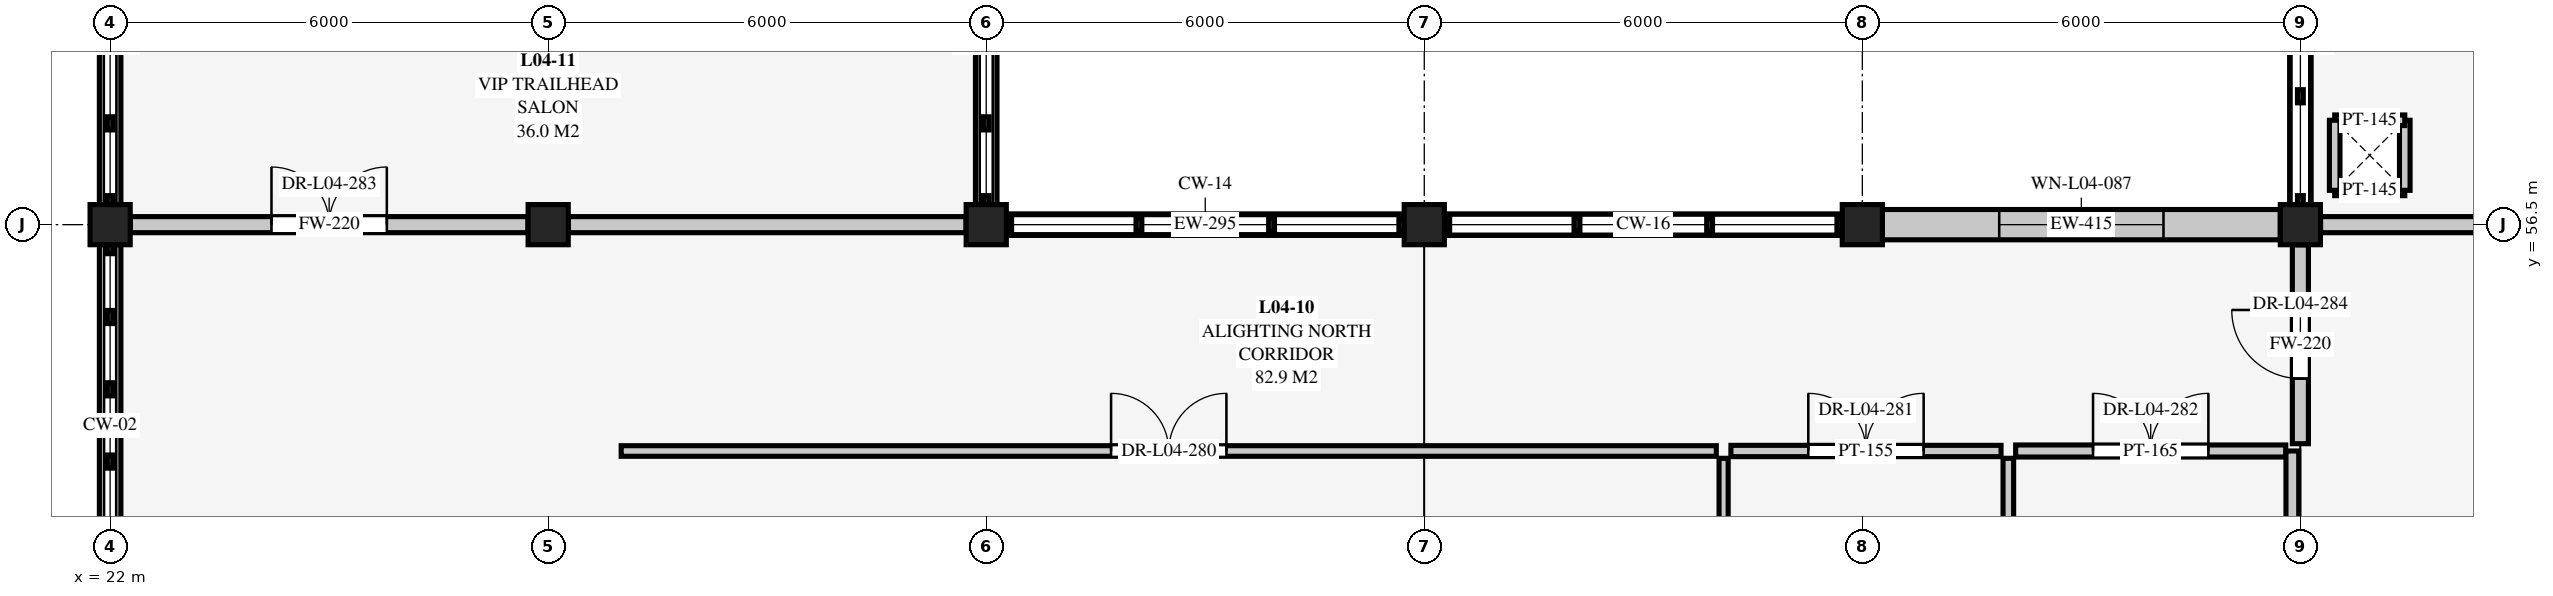
"""IFC4 building model, lengths in metres.
Left out: names, types, materials, properties, quantities, classifications, styles, units other than length and angle.
Written with IfcOpenShell. Run it as: python <this file> out.ifc"""

import sys

from ifc_helpers import new_model, si_unit, direction, frame, frame_2d, origin, origin_2d, place, context, subcontext, project, spatial, rectangle, extrude, element, fill, save


model = new_model("IFC4")
c1 = context("Model", 3, precision=1e-05, world=origin(), true_north=direction((0.0, 1.0)))
c2 = subcontext(c1, "Body", "Model", "MODEL_VIEW")
j1 = project(units=[si_unit("LENGTHUNIT", "METRE"), si_unit("PLANEANGLEUNIT", "RADIAN")], contexts=[c1])
p1 = place(None, origin())
s1 = spatial("IfcSite", under=j1, at=p1, CompositionType="ELEMENT")
p2 = place(p1, origin())
s2 = spatial("IfcBuilding", under=s1, at=p2, CompositionType="ELEMENT")
p3 = place(p2, frame((0.0, 0.0, 13.5)))
s3 = spatial("IfcBuildingStorey", under=s2, at=p3, CompositionType="ELEMENT", Elevation=13.5)
for number, where, z_axis, x_axis in (
    (1, (22.0, 56.5, 0.0), (0.0, 0.0, 1.0), (1.0, 0.0, 0.0)),
    (2, (28.0, 56.5, 0.0), (0.0, 0.0, 1.0), (1.0, 0.0, 0.0)),
    (3, (34.0, 56.5, 0.0), (0.0, 0.0, 1.0), (1.0, 0.0, 0.0)),
    (4, (40.0, 56.5, 0.0), (0.0, 0.0, 1.0), (1.0, 0.0, 0.0)),
    (5, (46.0, 56.5, 0.0), (0.0, 0.0, 1.0), (1.0, 0.0, 0.0)),
    (6, (52.0, 56.5, 0.0), (0.0, 0.0, 1.0), (1.0, 0.0, 0.0)),
):
    element("IfcColumn", number, at=place(p3, frame(where, z_axis=z_axis, x_axis=x_axis)), inside=s3, PredefinedType="COLUMN", context=c2, shape_type="SweptSolid", body=[
        extrude(rectangle(XDim=0.55, YDim=0.55, at=origin_2d()), origin(), (0.0, 0.0, 1.0), 4.5),
    ])
p4 = place(p3, frame((34.275, 56.5, 0.0), z_axis=(0.0, 0.0, 1.0), x_axis=(1.0, 0.0, 0.0)))
e7 = element("IfcWall", 7, at=p4, inside=s3, PredefinedType="SOLIDWALL", context=c2, shape_type="SweptSolid", body=[
    extrude(rectangle(XDim=5.45, YDim=0.295, at=frame_2d((2.725, 0.0))), origin(), (0.0, 0.0, 1.0), 0.41),
])
p5 = place(p3, frame((40.275, 56.5, 0.0), z_axis=(0.0, 0.0, 1.0), x_axis=(1.0, 0.0, 0.0)))
e8 = element("IfcWall", 8, at=p5, inside=s3, PredefinedType="SOLIDWALL", context=c2, shape_type="SweptSolid", body=[
    extrude(rectangle(XDim=5.45, YDim=0.295, at=frame_2d((2.725, 0.0))), origin(), (0.0, 0.0, 1.0), 0.52),
])
p6 = place(p3, frame((46.275, 56.5, 0.0), z_axis=(0.0, 0.0, 1.0), x_axis=(1.0, 0.0, 0.0)))
e9 = element("IfcWall", 9, at=p6, inside=s3, PredefinedType="SOLIDWALL", context=c2, shape_type="SweptSolid", body=[
    extrude(rectangle(XDim=5.45, YDim=0.415, at=frame_2d((2.725, 0.0))), origin(), (0.0, 0.0, 1.0), 3.843),
])
p7 = place(p6, frame((1.6, 0.0, 0.65)))
e10 = element("IfcOpeningElement", 10, at=p7, cuts=e9, PredefinedType="OPENING", context=c2, shape_type="SweptSolid", body=[
    extrude(rectangle(XDim=2.25, YDim=2.45, at=frame_2d((1.125, 1.225))), frame((0.0, 0.218, 0.0), z_axis=(0.0, -1.0, 0.0), x_axis=(1.0, 0.0, 0.0)), (0.0, 0.0, 1.0), 0.435),
])
p8 = place(p3, frame((22.0, 51.275, 0.0), z_axis=(0.0, 0.0, 1.0), x_axis=(0.0, 1.0, 0.0)))
e11 = element("IfcWall", 11, at=p8, inside=s3, PredefinedType="SOLIDWALL", context=c2, shape_type="SweptSolid", body=[
    extrude(rectangle(XDim=4.95, YDim=0.295, at=frame_2d((2.475, 0.0))), origin(), (0.0, 0.0, 1.0), 0.21),
])
p9 = place(p3, frame((22.0, 56.775, 0.0), z_axis=(0.0, 0.0, 1.0), x_axis=(0.0, 1.0, 0.0)))
e12 = element("IfcWall", 12, at=p9, inside=s3, PredefinedType="SOLIDWALL", context=c2, shape_type="SweptSolid", body=[
    extrude(rectangle(XDim=4.45, YDim=0.295, at=frame_2d((2.225, 0.0))), origin(), (0.0, 0.0, 1.0), 0.26),
])
p10 = place(p3, frame((34.0, 61.225, 0.0), z_axis=(0.0, 0.0, 1.0), x_axis=(0.0, -1.0, 0.0)))
e13 = element("IfcWall", 13, at=p10, inside=s3, PredefinedType="SOLIDWALL", context=c2, shape_type="SweptSolid", body=[
    extrude(rectangle(XDim=4.45, YDim=0.295, at=frame_2d((2.225, 0.0))), origin(), (0.0, 0.0, 1.0), 0.31),
])
p11 = place(p3, frame((52.0, 56.775, 0.0), z_axis=(0.0, 0.0, 1.0), x_axis=(0.0, 1.0, 0.0)))
e14 = element("IfcWall", 14, at=p11, inside=s3, PredefinedType="SOLIDWALL", context=c2, shape_type="SweptSolid", body=[
    extrude(rectangle(XDim=4.45, YDim=0.295, at=frame_2d((2.225, 0.0))), origin(), (0.0, 0.0, 1.0), 0.46),
])
for number, where, z_axis, x_axis in (
    (15, (52.47, 56.97, 0.0), (0.0, 0.0, 1.0), (1.0, 0.0, 0.0)),
    (16, (53.43, 56.97, 0.0), (0.0, 0.0, 1.0), (0.0, 1.0, 0.0)),
    (17, (53.43, 57.93, 0.0), (0.0, 0.0, 1.0), (-1.0, 0.0, 0.0)),
    (18, (52.47, 57.93, 0.0), (0.0, 0.0, 1.0), (0.0, -1.0, 0.0)),
):
    element("IfcWall", number, at=place(p3, frame(where, z_axis=z_axis, x_axis=x_axis)), inside=s3, PredefinedType="PARTITIONING", context=c2, shape_type="SweptSolid", body=[
        extrude(rectangle(XDim=0.96, YDim=0.145, at=frame_2d((0.48, 0.0))), origin(), (0.0, 0.0, 1.0), 4.24),
    ])
p12 = place(p3, frame((44.1, 45.124, 0.0), z_axis=(0.0, 0.0, 1.0), x_axis=(0.0, 1.0, 0.0)))
e19 = element("IfcWall", 19, at=p12, inside=s3, PredefinedType="PARTITIONING", context=c2, shape_type="SweptSolid", body=[
    extrude(rectangle(XDim=8.176, YDim=0.125, at=frame_2d((4.088, 0.0))), origin(), (0.0, 0.0, 1.0), 4.288),
])
p13 = place(p3, frame((29.0, 53.4, 0.0), z_axis=(0.0, 0.0, 1.0), x_axis=(1.0, 0.0, 0.0)))
e20 = element("IfcWall", 20, at=p13, inside=s3, PredefinedType="PARTITIONING", context=c2, shape_type="SweptSolid", body=[
    extrude(rectangle(XDim=15.0, YDim=0.145, at=frame_2d((7.5, 0.0))), origin(), (0.0, 0.0, 1.0), 4.288),
])
p14 = place(p13, frame((6.71, 0.0, 0.0)))
e21 = element("IfcOpeningElement", 21, at=p14, cuts=e20, PredefinedType="OPENING", context=c2, shape_type="SweptSolid", body=[
    extrude(rectangle(XDim=1.58, YDim=2.2, at=frame_2d((0.79, 1.1))), frame((0.0, 0.083, 0.0), z_axis=(0.0, -1.0, 0.0), x_axis=(1.0, 0.0, 0.0)), (0.0, 0.0, 1.0), 0.165),
])
p15 = place(p3, frame((48.0, 45.082, 0.0), z_axis=(0.0, 0.0, 1.0), x_axis=(0.0, 1.0, 0.0)))
e22 = element("IfcWall", 22, at=p15, inside=s3, PredefinedType="PARTITIONING", context=c2, shape_type="SweptSolid", body=[
    extrude(rectangle(XDim=8.218, YDim=0.145, at=frame_2d((4.109, 0.0))), origin(), (0.0, 0.0, 1.0), 3.933),
])
p16 = place(p3, frame((44.2, 53.4, 0.0), z_axis=(0.0, 0.0, 1.0), x_axis=(1.0, 0.0, 0.0)))
e23 = element("IfcWall", 23, at=p16, inside=s3, PredefinedType="PARTITIONING", context=c2, shape_type="SweptSolid", body=[
    extrude(rectangle(XDim=3.7, YDim=0.155, at=frame_2d((1.85, 0.0))), origin(), (0.0, 0.0, 1.0), 4.288),
])
p17 = place(p16, frame((1.06, 0.0, 0.0)))
e24 = element("IfcOpeningElement", 24, at=p17, cuts=e23, PredefinedType="OPENING", context=c2, shape_type="SweptSolid", body=[
    extrude(rectangle(XDim=1.58, YDim=2.2, at=frame_2d((0.79, 1.1))), frame((0.0, 0.088, 0.0), z_axis=(0.0, -1.0, 0.0), x_axis=(1.0, 0.0, 0.0)), (0.0, 0.0, 1.0), 0.175),
])
p18 = place(p3, frame((48.1, 53.4, 0.0), z_axis=(0.0, 0.0, 1.0), x_axis=(1.0, 0.0, 0.0)))
e25 = element("IfcWall", 25, at=p18, inside=s3, PredefinedType="PARTITIONING", context=c2, shape_type="SweptSolid", body=[
    extrude(rectangle(XDim=3.7, YDim=0.165, at=frame_2d((1.85, 0.0))), origin(), (0.0, 0.0, 1.0), 4.288),
])
p19 = place(p18, frame((1.06, 0.0, 0.0)))
e26 = element("IfcOpeningElement", 26, at=p19, cuts=e25, PredefinedType="OPENING", context=c2, shape_type="SweptSolid", body=[
    extrude(rectangle(XDim=1.58, YDim=2.2, at=frame_2d((0.79, 1.1))), frame((0.0, 0.093, 0.0), z_axis=(0.0, -1.0, 0.0), x_axis=(1.0, 0.0, 0.0)), (0.0, 0.0, 1.0), 0.185),
])
p20 = place(p3, frame((22.277, 56.5, 0.0), z_axis=(0.0, 0.0, 1.0), x_axis=(1.0, 0.0, 0.0)))
e27 = element("IfcWall", 27, at=p20, inside=s3, PredefinedType="SOLIDWALL", context=c2, shape_type="SweptSolid", body=[
    extrude(rectangle(XDim=5.446, YDim=0.22, at=frame_2d((2.723, 0.0))), origin(), (0.0, 0.0, 1.0), 3.944),
])
p21 = place(p20, frame((1.933, 0.0, 0.0)))
e28 = element("IfcOpeningElement", 28, at=p21, cuts=e27, PredefinedType="OPENING", context=c2, shape_type="SweptSolid", body=[
    extrude(rectangle(XDim=1.58, YDim=2.2, at=frame_2d((0.79, 1.1))), frame((0.0, 0.12, 0.0), z_axis=(0.0, -1.0, 0.0), x_axis=(1.0, 0.0, 0.0)), (0.0, 0.0, 1.0), 0.24),
])
p22 = place(p3, frame((28.277, 56.5, 0.0), z_axis=(0.0, 0.0, 1.0), x_axis=(1.0, 0.0, 0.0)))
e29 = element("IfcWall", 29, at=p22, inside=s3, PredefinedType="SOLIDWALL", context=c2, shape_type="SweptSolid", body=[
    extrude(rectangle(XDim=5.446, YDim=0.22, at=frame_2d((2.723, 0.0))), origin(), (0.0, 0.0, 1.0), 3.984),
])
p23 = place(p3, frame((52.0, 53.5, 0.0), z_axis=(0.0, 0.0, 1.0), x_axis=(0.0, 1.0, 0.0)))
e30 = element("IfcWall", 30, at=p23, inside=s3, PredefinedType="SOLIDWALL", context=c2, shape_type="SweptSolid", body=[
    extrude(rectangle(XDim=2.723, YDim=0.22, at=frame_2d((1.361, 0.0))), origin(), (0.0, 0.0, 1.0), 3.793),
])
p24 = place(p23, frame((0.892, 0.0, 0.0)))
e31 = element("IfcOpeningElement", 31, at=p24, cuts=e30, PredefinedType="OPENING", context=c2, shape_type="SweptSolid", body=[
    extrude(rectangle(XDim=0.94, YDim=2.1, at=frame_2d((0.47, 1.05))), frame((0.0, 0.12, 0.0), z_axis=(0.0, -1.0, 0.0), x_axis=(1.0, 0.0, 0.0)), (0.0, 0.0, 1.0), 0.24),
])
p25 = place(p3, frame((52.277, 56.5, 0.0), z_axis=(0.0, 0.0, 1.0), x_axis=(1.0, 0.0, 0.0)))
e32 = element("IfcWall", 32, at=p25, inside=s3, PredefinedType="SOLIDWALL", context=c2, shape_type="SweptSolid", body=[
    extrude(rectangle(XDim=5.446, YDim=0.22, at=frame_2d((2.723, 0.0))), origin(), (0.0, 0.0, 1.0), 3.793),
])
p26 = place(p3, frame((51.89, 50.725, 0.0), z_axis=(0.0, 0.0, 1.0), x_axis=(0.0, 1.0, 0.0)))
e33 = element("IfcWall", 33, at=p26, inside=s3, PredefinedType="PARTITIONING", context=c2, shape_type="SweptSolid", body=[
    extrude(rectangle(XDim=2.675, YDim=0.175, at=frame_2d((1.337, 0.0))), origin(), (0.0, 0.0, 1.0), 4.204),
])
p27 = place(p7, origin())
e34 = element("IfcWindow", 34, at=p27, inside=s3, PartitioningType="SINGLE_PANEL", PredefinedType="WINDOW", context=c2, shape_type="SweptSolid", body=[
    extrude(rectangle(XDim=2.25, YDim=2.45, at=frame_2d((1.125, 1.225))), frame((0.0, 0.03, 0.0), z_axis=(0.0, -1.0, 0.0), x_axis=(1.0, 0.0, 0.0)), (0.0, 0.0, 1.0), 0.06),
])
fill(e10, e34)
p28 = place(p14, origin())
e35 = element("IfcDoor", 35, at=p28, inside=s3, OperationType="DOUBLE_DOOR_SINGLE_SWING", PredefinedType="DOOR", context=c2, shape_type="SweptSolid", body=[
    extrude(rectangle(XDim=1.58, YDim=2.2, at=frame_2d((0.79, 1.1))), frame((0.0, 0.025, 0.0), z_axis=(0.0, -1.0, 0.0), x_axis=(1.0, 0.0, 0.0)), (0.0, 0.0, 1.0), 0.05),
])
fill(e21, e35)
p29 = place(p17, origin())
e36 = element("IfcDoor", 36, at=p29, inside=s3, OperationType="DOUBLE_DOOR_SINGLE_SWING", PredefinedType="DOOR", context=c2, shape_type="SweptSolid", body=[
    extrude(rectangle(XDim=1.58, YDim=2.2, at=frame_2d((0.79, 1.1))), frame((0.0, 0.025, 0.0), z_axis=(0.0, -1.0, 0.0), x_axis=(1.0, 0.0, 0.0)), (0.0, 0.0, 1.0), 0.05),
])
fill(e24, e36)
p30 = place(p19, origin())
e37 = element("IfcDoor", 37, at=p30, inside=s3, OperationType="DOUBLE_DOOR_SINGLE_SWING", PredefinedType="DOOR", context=c2, shape_type="SweptSolid", body=[
    extrude(rectangle(XDim=1.58, YDim=2.2, at=frame_2d((0.79, 1.1))), frame((0.0, 0.025, 0.0), z_axis=(0.0, -1.0, 0.0), x_axis=(1.0, 0.0, 0.0)), (0.0, 0.0, 1.0), 0.05),
])
fill(e26, e37)
p31 = place(p21, origin())
e38 = element("IfcDoor", 38, at=p31, inside=s3, OperationType="DOUBLE_DOOR_SINGLE_SWING", PredefinedType="DOOR", context=c2, shape_type="SweptSolid", body=[
    extrude(rectangle(XDim=1.58, YDim=2.2, at=frame_2d((0.79, 1.1))), frame((0.0, 0.025, 0.0), z_axis=(0.0, -1.0, 0.0), x_axis=(1.0, 0.0, 0.0)), (0.0, 0.0, 1.0), 0.05),
])
fill(e28, e38)
p32 = place(p24, origin())
e39 = element("IfcDoor", 39, at=p32, inside=s3, OperationType="SINGLE_SWING_RIGHT", PredefinedType="DOOR", context=c2, shape_type="SweptSolid", body=[
    extrude(rectangle(XDim=0.94, YDim=2.1, at=frame_2d((0.47, 1.05))), frame((0.0, 0.025, 0.0), z_axis=(0.0, -1.0, 0.0), x_axis=(1.0, 0.0, 0.0)), (0.0, 0.0, 1.0), 0.05),
])
fill(e31, e39)
save(model, sys.argv[1])
